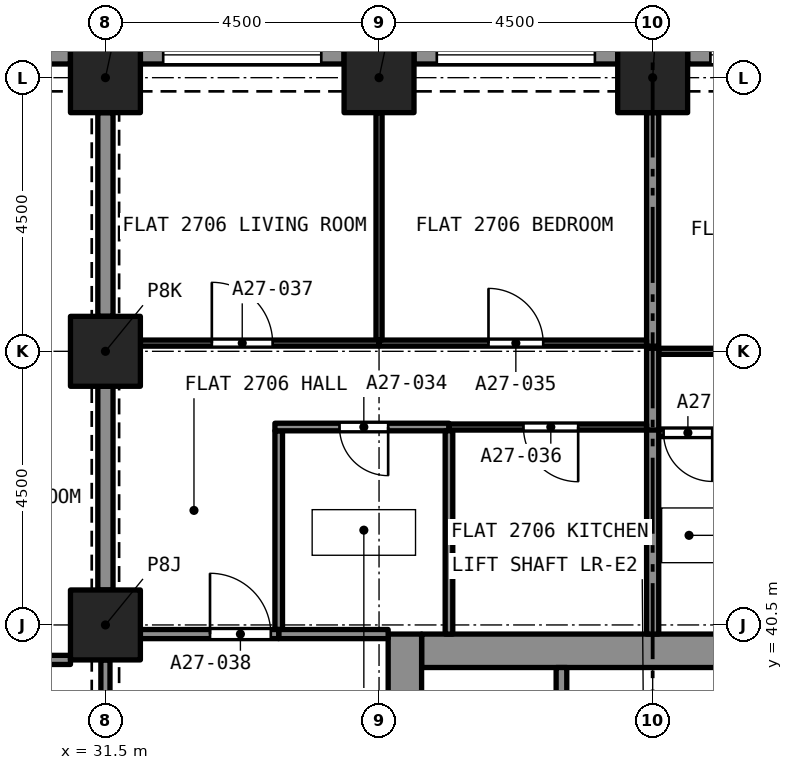
"""IFC4 building model, lengths in metres.
Left out: names, types, materials, properties, quantities, classifications, styles, units other than length and angle.
Written with IfcOpenShell. Run it as: python <this file> out.ifc"""

import sys

from ifc_helpers import new_model, si_unit, direction, frame, frame_2d, origin, origin_2d, place, context, subcontext, project, spatial, rectangle, extrude, element, fill, save


model = new_model("IFC4")
c1 = context("Model", 3, precision=1e-05, world=origin(), true_north=direction((0.0, 1.0)))
c2 = subcontext(c1, "Body", "Model", "MODEL_VIEW")
j1 = project(units=[si_unit("LENGTHUNIT", "METRE"), si_unit("PLANEANGLEUNIT", "RADIAN")], contexts=[c1])
p1 = place(None, origin())
s1 = spatial("IfcSite", under=j1, at=p1, CompositionType="ELEMENT")
p2 = place(p1, origin())
s2 = spatial("IfcBuilding", under=s1, at=p2, CompositionType="ELEMENT")
p3 = place(p2, frame((0.0, 0.0, 99.2)))
s3 = spatial("IfcBuildingStorey", under=s2, at=p3, CompositionType="ELEMENT", Elevation=99.2)
for number, where, z_axis, x_axis in (
    (1, (31.5, 40.5, 0.0), (0.0, 0.0, 1.0), (1.0, 0.0, 0.0)),
    (2, (31.5, 45.0, 0.0), (0.0, 0.0, 1.0), (1.0, 0.0, 0.0)),
    (3, (31.5, 49.5, 0.0), (0.0, 0.0, 1.0), (1.0, 0.0, 0.0)),
    (4, (36.0, 49.5, 0.0), (0.0, 0.0, 1.0), (1.0, 0.0, 0.0)),
    (5, (40.5, 49.5, 0.0), (0.0, 0.0, 1.0), (1.0, 0.0, 0.0)),
):
    element("IfcColumn", number, at=place(p3, frame(where, z_axis=z_axis, x_axis=x_axis)), inside=s3, PredefinedType="COLUMN", context=c2, shape_type="SweptSolid", body=[
        extrude(rectangle(XDim=1.15, YDim=1.15, at=origin_2d()), origin(), (0.0, 0.0, 1.0), 3.2),
    ])
p4 = place(p3, frame((36.7, 40.075, 0.0), z_axis=(0.0, 0.0, 1.0), x_axis=(1.0, 0.0, 0.0)))
e6 = element("IfcWall", 6, at=p4, inside=s3, PredefinedType="SOLIDWALL", context=c2, shape_type="SweptSolid", body=[
    extrude(rectangle(XDim=7.6, YDim=0.55, at=frame_2d((3.8, 0.0))), origin(), (0.0, 0.0, 1.0), 3.2),
])
p5 = place(p3, frame((36.425, 27.15, 0.0), z_axis=(0.0, 0.0, 1.0), x_axis=(0.0, 1.0, 0.0)))
e7 = element("IfcWall", 7, at=p5, inside=s3, PredefinedType="SOLIDWALL", context=c2, shape_type="SweptSolid", body=[
    extrude(rectangle(XDim=13.2, YDim=0.55, at=frame_2d((6.6, 0.0))), origin(), (0.0, 0.0, 1.0), 3.2),
])
p6 = place(p5, frame((8.8, 0.0, 0.0)))
e8 = element("IfcOpeningElement", 8, at=p6, cuts=e7, PredefinedType="OPENING", context=c2, shape_type="SweptSolid", body=[
    extrude(rectangle(XDim=1.2, YDim=2.1, at=frame_2d((0.6, 1.05))), frame((0.0, 0.285, 0.0), z_axis=(0.0, -1.0, 0.0), x_axis=(1.0, 0.0, 0.0)), (0.0, 0.0, 1.0), 0.57),
])
p7 = place(p3, frame((41.075, 49.875, 0.0), z_axis=(0.0, 0.0, 1.0), x_axis=(1.0, 0.0, 0.0)))
e9 = element("IfcWall", 9, at=p7, inside=s3, PredefinedType="SOLIDWALL", context=c2, shape_type="SweptSolid", body=[
    extrude(rectangle(XDim=3.35, YDim=0.3, at=frame_2d((1.675, 0.0))), origin(), (0.0, 0.0, 1.0), 3.2),
])
p8 = place(p7, frame((0.375, 0.0, 0.45)))
e10 = element("IfcOpeningElement", 10, at=p8, cuts=e9, PredefinedType="OPENING", context=c2, shape_type="SweptSolid", body=[
    extrude(rectangle(XDim=2.6, YDim=1.95, at=frame_2d((1.3, 0.975))), frame((0.0, 0.16, 0.0), z_axis=(0.0, -1.0, 0.0), x_axis=(1.0, 0.0, 0.0)), (0.0, 0.0, 1.0), 0.32),
])
p9 = place(p3, frame((36.575, 49.875, 0.0), z_axis=(0.0, 0.0, 1.0), x_axis=(1.0, 0.0, 0.0)))
e11 = element("IfcWall", 11, at=p9, inside=s3, PredefinedType="SOLIDWALL", context=c2, shape_type="SweptSolid", body=[
    extrude(rectangle(XDim=3.35, YDim=0.3, at=frame_2d((1.675, 0.0))), origin(), (0.0, 0.0, 1.0), 3.2),
])
p10 = place(p9, frame((0.375, 0.0, 0.45)))
e12 = element("IfcOpeningElement", 12, at=p10, cuts=e11, PredefinedType="OPENING", context=c2, shape_type="SweptSolid", body=[
    extrude(rectangle(XDim=2.6, YDim=1.95, at=frame_2d((1.3, 0.975))), frame((0.0, 0.16, 0.0), z_axis=(0.0, -1.0, 0.0), x_axis=(1.0, 0.0, 0.0)), (0.0, 0.0, 1.0), 0.32),
])
p11 = place(p3, frame((32.075, 49.875, 0.0), z_axis=(0.0, 0.0, 1.0), x_axis=(1.0, 0.0, 0.0)))
e13 = element("IfcWall", 13, at=p11, inside=s3, PredefinedType="SOLIDWALL", context=c2, shape_type="SweptSolid", body=[
    extrude(rectangle(XDim=3.35, YDim=0.3, at=frame_2d((1.675, 0.0))), origin(), (0.0, 0.0, 1.0), 3.2),
])
p12 = place(p11, frame((0.375, 0.0, 0.45)))
e14 = element("IfcOpeningElement", 14, at=p12, cuts=e13, PredefinedType="OPENING", context=c2, shape_type="SweptSolid", body=[
    extrude(rectangle(XDim=2.6, YDim=1.95, at=frame_2d((1.3, 0.975))), frame((0.0, 0.16, 0.0), z_axis=(0.0, -1.0, 0.0), x_axis=(1.0, 0.0, 0.0)), (0.0, 0.0, 1.0), 0.32),
])
p13 = place(p3, frame((27.575, 49.875, 0.0), z_axis=(0.0, 0.0, 1.0), x_axis=(1.0, 0.0, 0.0)))
e15 = element("IfcWall", 15, at=p13, inside=s3, PredefinedType="SOLIDWALL", context=c2, shape_type="SweptSolid", body=[
    extrude(rectangle(XDim=3.35, YDim=0.3, at=frame_2d((1.675, 0.0))), origin(), (0.0, 0.0, 1.0), 3.2),
])
p14 = place(p13, frame((0.375, 0.0, 0.45)))
e16 = element("IfcOpeningElement", 16, at=p14, cuts=e15, PredefinedType="OPENING", context=c2, shape_type="SweptSolid", body=[
    extrude(rectangle(XDim=2.6, YDim=1.95, at=frame_2d((1.3, 0.975))), frame((0.0, 0.16, 0.0), z_axis=(0.0, -1.0, 0.0), x_axis=(1.0, 0.0, 0.0)), (0.0, 0.0, 1.0), 0.32),
])
p15 = place(p3, frame((41.659, 43.66, 0.0), z_axis=(0.0, 0.0, 1.0), x_axis=(-1.0, 0.0, 0.0)))
e17 = element("IfcWall", 17, at=p15, inside=s3, PredefinedType="PARTITIONING", context=c2, shape_type="SweptSolid", body=[
    extrude(rectangle(XDim=1.059, YDim=0.125, at=frame_2d((0.53, 0.0))), origin(), (0.0, 0.0, 1.0), 2.9),
])
p16 = place(p15, frame((0.179, 0.0, 0.0)))
e18 = element("IfcOpeningElement", 18, at=p16, cuts=e17, PredefinedType="OPENING", context=c2, shape_type="SweptSolid", body=[
    extrude(rectangle(XDim=0.8, YDim=2.1, at=frame_2d((0.4, 1.05))), frame((0.0, 0.073, 0.0), z_axis=(0.0, -1.0, 0.0), x_axis=(1.0, 0.0, 0.0)), (0.0, 0.0, 1.0), 0.145),
])
p17 = place(p3, frame((40.5, 40.35, 0.0), z_axis=(0.0, 0.0, 1.0), x_axis=(0.0, 1.0, 0.0)))
e19 = element("IfcWall", 19, at=p17, inside=s3, PredefinedType="PARTITIONING", context=c2, shape_type="SweptSolid", body=[
    extrude(rectangle(XDim=3.372, YDim=0.2, at=frame_2d((1.686, 0.0))), origin(), (0.0, 0.0, 1.0), 2.9),
])
p18 = place(p3, frame((40.6, 45.0, 0.0), z_axis=(0.0, 0.0, 1.0), x_axis=(1.0, 0.0, 0.0)))
e20 = element("IfcWall", 20, at=p18, inside=s3, PredefinedType="PARTITIONING", context=c2, shape_type="SweptSolid", body=[
    extrude(rectangle(XDim=4.4, YDim=0.1, at=frame_2d((2.2, 0.0))), origin(), (0.0, 0.0, 1.0), 2.9),
])
p19 = place(p18, frame((1.7, 0.0, 0.0)))
e21 = element("IfcOpeningElement", 21, at=p19, cuts=e20, PredefinedType="OPENING", context=c2, shape_type="SweptSolid", body=[
    extrude(rectangle(XDim=0.9, YDim=2.1, at=frame_2d((0.45, 1.05))), frame((0.0, 0.06, 0.0), z_axis=(0.0, -1.0, 0.0), x_axis=(1.0, 0.0, 0.0)), (0.0, 0.0, 1.0), 0.12),
])
p20 = place(p3, frame((40.5, 45.085, 0.0), z_axis=(0.0, 0.0, 1.0), x_axis=(0.0, 1.0, 0.0)))
e22 = element("IfcWall", 22, at=p20, inside=s3, PredefinedType="PARTITIONING", context=c2, shape_type="SweptSolid", body=[
    extrude(rectangle(XDim=3.84, YDim=0.2, at=frame_2d((1.92, 0.0))), origin(), (0.0, 0.0, 1.0), 2.9),
])
p21 = place(p3, frame((40.5, 43.705, 0.0), z_axis=(0.0, 0.0, 1.0), x_axis=(0.0, 1.0, 0.0)))
e23 = element("IfcWall", 23, at=p21, inside=s3, PredefinedType="PARTITIONING", context=c2, shape_type="SweptSolid", body=[
    extrude(rectangle(XDim=1.345, YDim=0.2, at=frame_2d((0.672, 0.0))), origin(), (0.0, 0.0, 1.0), 2.9),
])
p22 = place(p3, frame((34.35, 40.425, 0.0), z_axis=(0.0, 0.0, 1.0), x_axis=(0.0, 1.0, 0.0)))
e24 = element("IfcWall", 24, at=p22, inside=s3, PredefinedType="PARTITIONING", context=c2, shape_type="SweptSolid", body=[
    extrude(rectangle(XDim=3.267, YDim=0.125, at=frame_2d((1.634, 0.0))), origin(), (0.0, 0.0, 1.0), 2.9),
])
p23 = place(p3, frame((37.15, 43.755, 0.0), z_axis=(0.0, 0.0, 1.0), x_axis=(-1.0, 0.0, 0.0)))
e25 = element("IfcWall", 25, at=p23, inside=s3, PredefinedType="PARTITIONING", context=c2, shape_type="SweptSolid", body=[
    extrude(rectangle(XDim=2.862, YDim=0.125, at=frame_2d((1.431, 0.0))), origin(), (0.0, 0.0, 1.0), 2.9),
])
p24 = place(p23, frame((1.0, 0.0, 0.0)))
e26 = element("IfcOpeningElement", 26, at=p24, cuts=e25, PredefinedType="OPENING", context=c2, shape_type="SweptSolid", body=[
    extrude(rectangle(XDim=0.8, YDim=2.1, at=frame_2d((0.4, 1.05))), frame((0.0, 0.073, 0.0), z_axis=(0.0, -1.0, 0.0), x_axis=(1.0, 0.0, 0.0)), (0.0, 0.0, 1.0), 0.145),
])
p25 = place(p3, frame((37.15, 40.35, 0.0), z_axis=(0.0, 0.0, 1.0), x_axis=(0.0, 1.0, 0.0)))
e27 = element("IfcWall", 27, at=p25, inside=s3, PredefinedType="PARTITIONING", context=c2, shape_type="SweptSolid", body=[
    extrude(rectangle(XDim=3.342, YDim=0.125, at=frame_2d((1.671, 0.0))), origin(), (0.0, 0.0, 1.0), 2.9),
])
p26 = place(p3, frame((34.35, 40.35, 0.0), z_axis=(0.0, 0.0, 1.0), x_axis=(1.0, 0.0, 0.0)))
e28 = element("IfcWall", 28, at=p26, inside=s3, PredefinedType="PARTITIONING", context=c2, shape_type="SweptSolid", body=[
    extrude(rectangle(XDim=1.8, YDim=0.15, at=frame_2d((0.9, 0.0))), origin(), (0.0, 0.0, 1.0), 2.9),
])
p27 = place(p3, frame((36.0, 45.135, 0.0), z_axis=(0.0, 0.0, 1.0), x_axis=(1.0, 0.0, 0.0)))
e29 = element("IfcWall", 29, at=p27, inside=s3, PredefinedType="PARTITIONING", context=c2, shape_type="SweptSolid", body=[
    extrude(rectangle(XDim=4.4, YDim=0.1, at=frame_2d((2.2, 0.0))), origin(), (0.0, 0.0, 1.0), 2.9),
])
p28 = place(p27, frame((1.8, 0.0, 0.0)))
e30 = element("IfcOpeningElement", 30, at=p28, cuts=e29, PredefinedType="OPENING", context=c2, shape_type="SweptSolid", body=[
    extrude(rectangle(XDim=0.9, YDim=2.1, at=frame_2d((0.45, 1.05))), frame((0.0, 0.06, 0.0), z_axis=(0.0, -1.0, 0.0), x_axis=(1.0, 0.0, 0.0)), (0.0, 0.0, 1.0), 0.12),
])
p29 = place(p3, frame((36.0, 45.185, 0.0), z_axis=(0.0, 0.0, 1.0), x_axis=(0.0, 1.0, 0.0)))
e31 = element("IfcWall", 31, at=p29, inside=s3, PredefinedType="PARTITIONING", context=c2, shape_type="SweptSolid", body=[
    extrude(rectangle(XDim=3.74, YDim=0.1, at=frame_2d((1.87, 0.0))), origin(), (0.0, 0.0, 1.0), 2.9),
])
p30 = place(p3, frame((40.4, 43.755, 0.0), z_axis=(0.0, 0.0, 1.0), x_axis=(-1.0, 0.0, 0.0)))
e32 = element("IfcWall", 32, at=p30, inside=s3, PredefinedType="PARTITIONING", context=c2, shape_type="SweptSolid", body=[
    extrude(rectangle(XDim=3.25, YDim=0.1, at=frame_2d((1.625, 0.0))), origin(), (0.0, 0.0, 1.0), 2.9),
])
p31 = place(p30, frame((1.125, 0.0, 0.0)))
e33 = element("IfcOpeningElement", 33, at=p31, cuts=e32, PredefinedType="OPENING", context=c2, shape_type="SweptSolid", body=[
    extrude(rectangle(XDim=0.9, YDim=2.1, at=frame_2d((0.45, 1.05))), frame((0.0, 0.06, 0.0), z_axis=(0.0, -1.0, 0.0), x_axis=(1.0, 0.0, 0.0)), (0.0, 0.0, 1.0), 0.12),
])
p32 = place(p3, frame((32.075, 45.135, 0.0), z_axis=(0.0, 0.0, 1.0), x_axis=(1.0, 0.0, 0.0)))
e34 = element("IfcWall", 34, at=p32, inside=s3, PredefinedType="PARTITIONING", context=c2, shape_type="SweptSolid", body=[
    extrude(rectangle(XDim=3.925, YDim=0.1, at=frame_2d((1.962, 0.0))), origin(), (0.0, 0.0, 1.0), 2.9),
])
p33 = place(p32, frame((1.175, 0.0, 0.0)))
e35 = element("IfcOpeningElement", 35, at=p33, cuts=e34, PredefinedType="OPENING", context=c2, shape_type="SweptSolid", body=[
    extrude(rectangle(XDim=1.0, YDim=2.1, at=frame_2d((0.5, 1.05))), frame((0.0, 0.06, 0.0), z_axis=(0.0, -1.0, 0.0), x_axis=(1.0, 0.0, 0.0)), (0.0, 0.0, 1.0), 0.12),
])
p34 = place(p3, frame((31.5, 41.075, 0.0), z_axis=(0.0, 0.0, 1.0), x_axis=(0.0, 1.0, 0.0)))
e36 = element("IfcWall", 36, at=p34, inside=s3, PredefinedType="PARTITIONING", context=c2, shape_type="SweptSolid", body=[
    extrude(rectangle(XDim=3.35, YDim=0.25, at=frame_2d((1.675, 0.0))), origin(), (0.0, 0.0, 1.0), 2.38),
])
p35 = place(p3, frame((32.075, 40.35, 0.0), z_axis=(0.0, 0.0, 1.0), x_axis=(1.0, 0.0, 0.0)))
e37 = element("IfcWall", 37, at=p35, inside=s3, PredefinedType="PARTITIONING", context=c2, shape_type="SweptSolid", body=[
    extrude(rectangle(XDim=2.275, YDim=0.15, at=frame_2d((1.138, 0.0))), origin(), (0.0, 0.0, 1.0), 2.9),
])
p36 = place(p35, frame((1.145, 0.0, 0.0)))
e38 = element("IfcOpeningElement", 38, at=p36, cuts=e37, PredefinedType="OPENING", context=c2, shape_type="SweptSolid", body=[
    extrude(rectangle(XDim=1.0, YDim=2.1, at=frame_2d((0.5, 1.05))), frame((0.0, 0.085, 0.0), z_axis=(0.0, -1.0, 0.0), x_axis=(1.0, 0.0, 0.0)), (0.0, 0.0, 1.0), 0.17),
])
p37 = place(p3, frame((31.5, 45.575, 0.0), z_axis=(0.0, 0.0, 1.0), x_axis=(0.0, 1.0, 0.0)))
e39 = element("IfcWall", 39, at=p37, inside=s3, PredefinedType="PARTITIONING", context=c2, shape_type="SweptSolid", body=[
    extrude(rectangle(XDim=3.35, YDim=0.25, at=frame_2d((1.675, 0.0))), origin(), (0.0, 0.0, 1.0), 2.38),
])
p38 = place(p3, frame((27.0, 39.925, 0.0), z_axis=(0.0, 0.0, 1.0), x_axis=(1.0, 0.0, 0.0)))
e40 = element("IfcWall", 40, at=p38, inside=s3, PredefinedType="PARTITIONING", context=c2, shape_type="SweptSolid", body=[
    extrude(rectangle(XDim=3.925, YDim=0.15, at=frame_2d((1.962, 0.0))), origin(), (0.0, 0.0, 1.0), 2.75),
])
p39 = place(p38, frame((1.75, 0.0, 0.0)))
e41 = element("IfcOpeningElement", 41, at=p39, cuts=e40, PredefinedType="OPENING", context=c2, shape_type="SweptSolid", body=[
    extrude(rectangle(XDim=1.0, YDim=2.1, at=frame_2d((0.5, 1.05))), frame((0.0, 0.085, 0.0), z_axis=(0.0, -1.0, 0.0), x_axis=(1.0, 0.0, 0.0)), (0.0, 0.0, 1.0), 0.17),
])
p40 = place(p3, frame((31.5, 36.575, 0.0), z_axis=(0.0, 0.0, 1.0), x_axis=(0.0, 1.0, 0.0)))
e42 = element("IfcWall", 42, at=p40, inside=s3, PredefinedType="PARTITIONING", context=c2, shape_type="SweptSolid", body=[
    extrude(rectangle(XDim=3.35, YDim=0.15, at=frame_2d((1.675, 0.0))), origin(), (0.0, 0.0, 1.0), 2.38),
])
p41 = place(p40, frame((1.075, 0.0, 0.0)))
e43 = element("IfcOpeningElement", 43, at=p41, cuts=e42, PredefinedType="OPENING", context=c2, shape_type="SweptSolid", body=[
    extrude(rectangle(XDim=1.2, YDim=2.1, at=frame_2d((0.6, 1.05))), frame((0.0, 0.085, 0.0), z_axis=(0.0, -1.0, 0.0), x_axis=(1.0, 0.0, 0.0)), (0.0, 0.0, 1.0), 0.17),
])
p42 = place(p3, frame((39.0, 37.5, 0.0), z_axis=(0.0, 0.0, 1.0), x_axis=(0.0, 1.0, 0.0)))
e44 = element("IfcWall", 44, at=p42, inside=s3, PredefinedType="SOLIDWALL", context=c2, shape_type="SweptSolid", body=[
    extrude(rectangle(XDim=2.3, YDim=0.175, at=frame_2d((1.15, 0.0))), origin(), (0.0, 0.0, 1.0), 2.9),
])
p43 = place(p8, origin())
e45 = element("IfcWindow", 45, at=p43, inside=s3, PartitioningType="SINGLE_PANEL", PredefinedType="WINDOW", context=c2, shape_type="SweptSolid", body=[
    extrude(rectangle(XDim=2.6, YDim=1.95, at=frame_2d((1.3, 0.975))), frame((0.0, 0.03, 0.0), z_axis=(0.0, -1.0, 0.0), x_axis=(1.0, 0.0, 0.0)), (0.0, 0.0, 1.0), 0.06),
])
fill(e10, e45)
p44 = place(p10, origin())
e46 = element("IfcWindow", 46, at=p44, inside=s3, PartitioningType="SINGLE_PANEL", PredefinedType="WINDOW", context=c2, shape_type="SweptSolid", body=[
    extrude(rectangle(XDim=2.6, YDim=1.95, at=frame_2d((1.3, 0.975))), frame((0.0, 0.03, 0.0), z_axis=(0.0, -1.0, 0.0), x_axis=(1.0, 0.0, 0.0)), (0.0, 0.0, 1.0), 0.06),
])
fill(e12, e46)
p45 = place(p12, origin())
e47 = element("IfcWindow", 47, at=p45, inside=s3, PartitioningType="SINGLE_PANEL", PredefinedType="WINDOW", context=c2, shape_type="SweptSolid", body=[
    extrude(rectangle(XDim=2.6, YDim=1.95, at=frame_2d((1.3, 0.975))), frame((0.0, 0.03, 0.0), z_axis=(0.0, -1.0, 0.0), x_axis=(1.0, 0.0, 0.0)), (0.0, 0.0, 1.0), 0.06),
])
fill(e14, e47)
p46 = place(p16, origin())
e48 = element("IfcDoor", 48, at=p46, inside=s3, OperationType="SINGLE_SWING_RIGHT", PredefinedType="DOOR", context=c2, shape_type="SweptSolid", body=[
    extrude(rectangle(XDim=0.8, YDim=2.1, at=frame_2d((0.4, 1.05))), frame((0.0, 0.025, 0.0), z_axis=(0.0, -1.0, 0.0), x_axis=(1.0, 0.0, 0.0)), (0.0, 0.0, 1.0), 0.05),
])
fill(e18, e48)
p47 = place(p24, origin())
e49 = element("IfcDoor", 49, at=p47, inside=s3, OperationType="SINGLE_SWING_LEFT", PredefinedType="DOOR", context=c2, shape_type="SweptSolid", body=[
    extrude(rectangle(XDim=0.8, YDim=2.1, at=frame_2d((0.4, 1.05))), frame((0.0, 0.025, 0.0), z_axis=(0.0, -1.0, 0.0), x_axis=(1.0, 0.0, 0.0)), (0.0, 0.0, 1.0), 0.05),
])
fill(e26, e49)
p48 = place(p28, origin())
e50 = element("IfcDoor", 50, at=p48, inside=s3, OperationType="SINGLE_SWING_RIGHT", PredefinedType="DOOR", context=c2, shape_type="SweptSolid", body=[
    extrude(rectangle(XDim=0.9, YDim=2.1, at=frame_2d((0.45, 1.05))), frame((0.0, 0.025, 0.0), z_axis=(0.0, -1.0, 0.0), x_axis=(1.0, 0.0, 0.0)), (0.0, 0.0, 1.0), 0.05),
])
fill(e30, e50)
p49 = place(p31, origin())
e51 = element("IfcDoor", 51, at=p49, inside=s3, OperationType="SINGLE_SWING_LEFT", PredefinedType="DOOR", context=c2, shape_type="SweptSolid", body=[
    extrude(rectangle(XDim=0.9, YDim=2.1, at=frame_2d((0.45, 1.05))), frame((0.0, 0.025, 0.0), z_axis=(0.0, -1.0, 0.0), x_axis=(1.0, 0.0, 0.0)), (0.0, 0.0, 1.0), 0.05),
])
fill(e33, e51)
p50 = place(p33, origin())
e52 = element("IfcDoor", 52, at=p50, inside=s3, OperationType="SINGLE_SWING_LEFT", PredefinedType="DOOR", context=c2, shape_type="SweptSolid", body=[
    extrude(rectangle(XDim=1.0, YDim=2.1, at=frame_2d((0.5, 1.05))), frame((0.0, 0.025, 0.0), z_axis=(0.0, -1.0, 0.0), x_axis=(1.0, 0.0, 0.0)), (0.0, 0.0, 1.0), 0.05),
])
fill(e35, e52)
p51 = place(p36, origin())
e53 = element("IfcDoor", 53, at=p51, inside=s3, OperationType="SINGLE_SWING_RIGHT", PredefinedType="DOOR", context=c2, shape_type="SweptSolid", body=[
    extrude(rectangle(XDim=1.0, YDim=2.1, at=frame_2d((0.5, 1.05))), frame((0.0, 0.025, 0.0), z_axis=(0.0, -1.0, 0.0), x_axis=(1.0, 0.0, 0.0)), (0.0, 0.0, 1.0), 0.05),
])
fill(e38, e53)
save(model, sys.argv[1])
